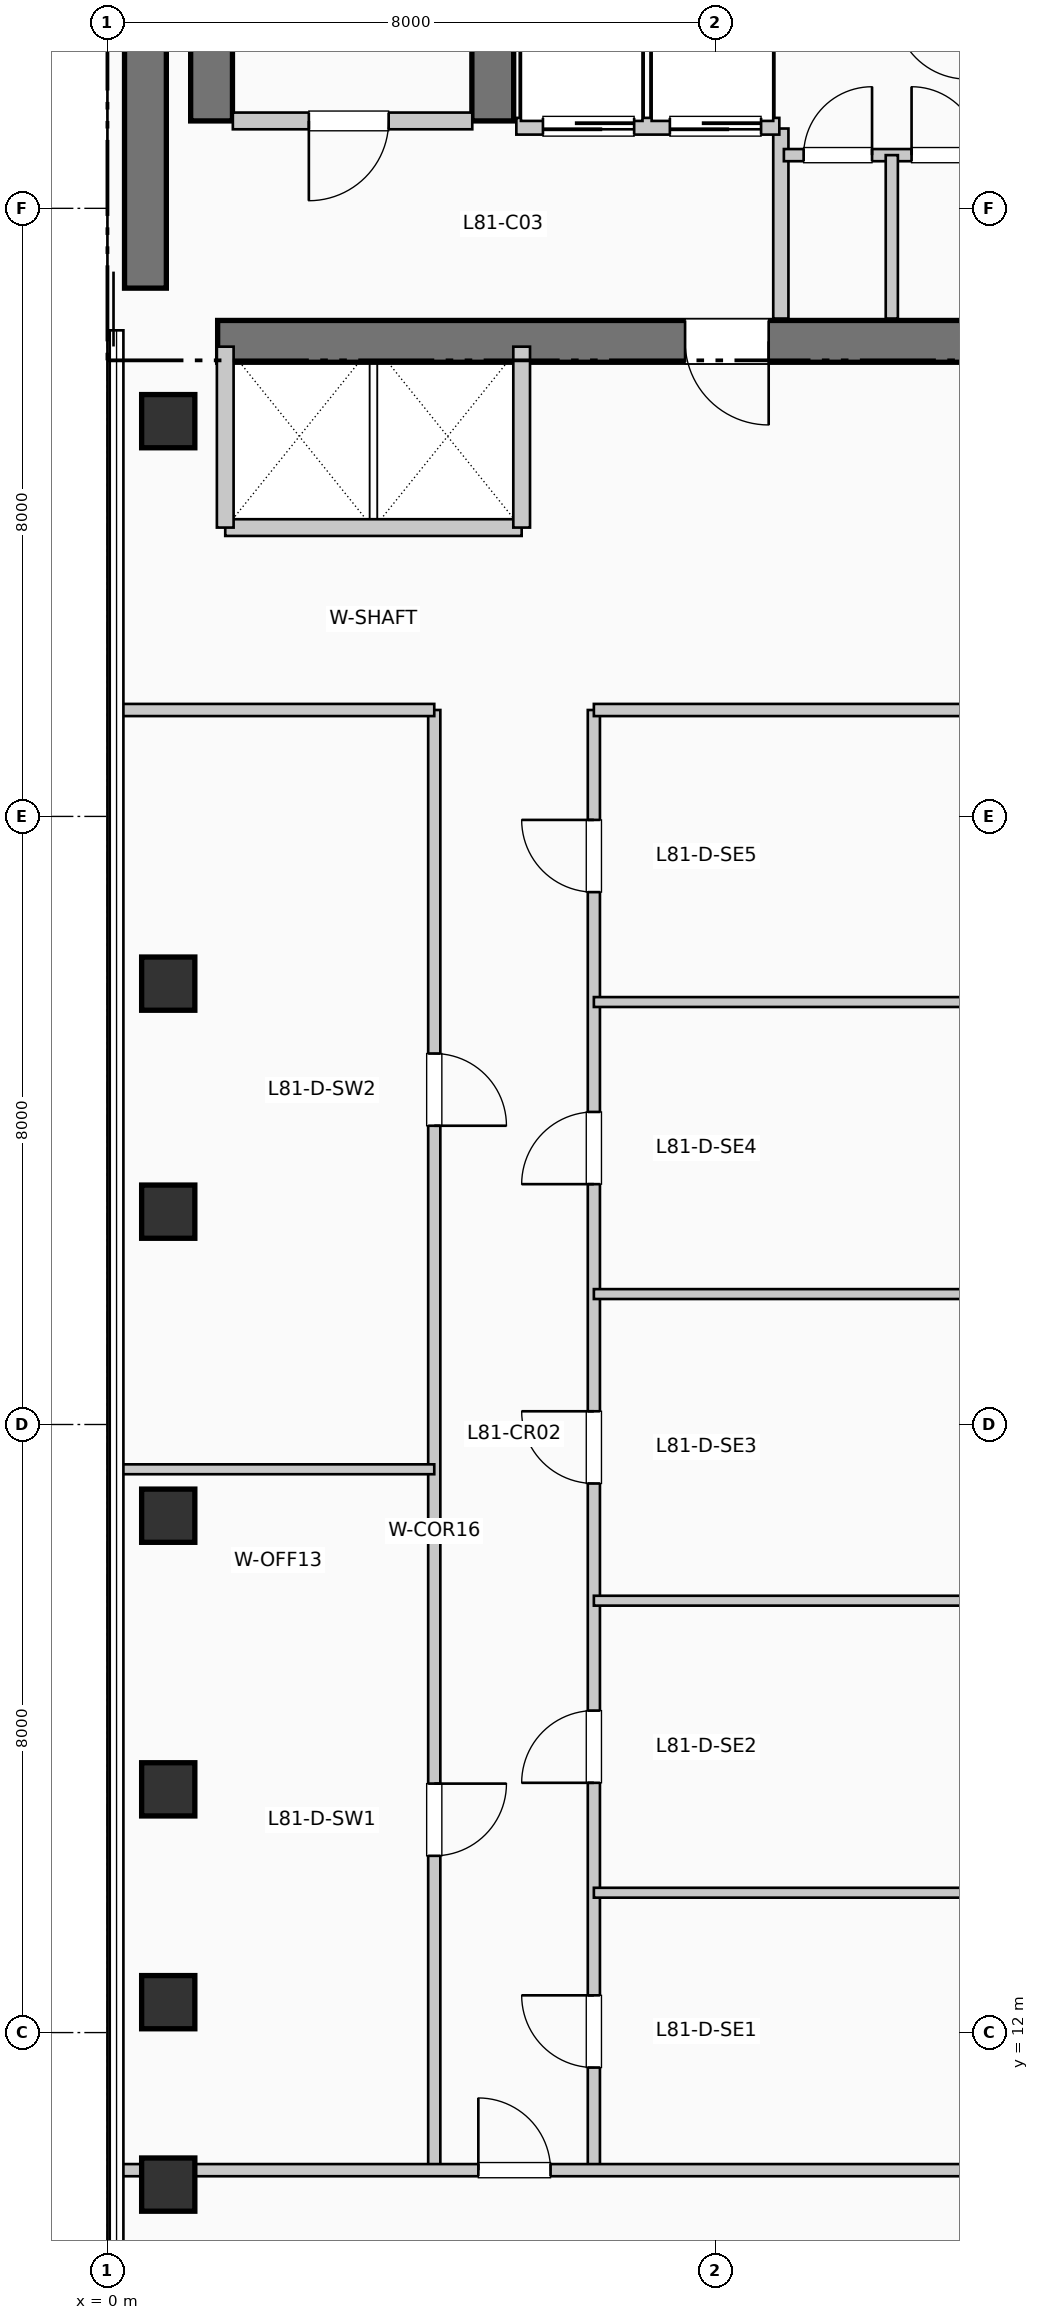
"""IFC4 building model, lengths in metres.
Left out: names, types, materials, properties, quantities, classifications, styles, units other than length and angle.
Written with IfcOpenShell. Run it as: python <this file> out.ifc"""

import sys

from ifc_helpers import new_model, si_unit, direction, frame, frame_2d, origin, origin_2d, place, context, subcontext, project, spatial, rectangle, extrude, element, fill, save


model = new_model("IFC4")
c1 = context("Model", 3, precision=1e-05, world=origin(), true_north=direction((0.0, 1.0)))
c2 = subcontext(c1, "Body", "Model", "MODEL_VIEW")
j1 = project(units=[si_unit("LENGTHUNIT", "METRE"), si_unit("PLANEANGLEUNIT", "RADIAN")], contexts=[c1])
p1 = place(None, origin())
s1 = spatial("IfcSite", under=j1, at=p1, CompositionType="ELEMENT")
p2 = place(p1, origin())
s2 = spatial("IfcBuilding", under=s1, at=p2, CompositionType="ELEMENT")
p3 = place(p2, frame((0.0, 0.0, 331.65)))
s3 = spatial("IfcBuildingStorey", under=s2, at=p3, CompositionType="ELEMENT", Elevation=331.65)
p4 = place(p3, frame((0.5, 34.95, 0.0), z_axis=(0.0, 0.0, 1.0), x_axis=(0.0, 1.0, 0.0)))
e1 = element("IfcWall", 1, at=p4, inside=s3, PredefinedType="SHEAR", context=c2, shape_type="SweptSolid", body=[
    extrude(rectangle(XDim=7.9, YDim=0.55, at=frame_2d((3.95, 0.0))), origin(), (0.0, 0.0, 1.0), 3.96),
])
p5 = place(p3, frame((1.45, 34.25, 0.0), z_axis=(0.0, 0.0, 1.0), x_axis=(1.0, 0.0, 0.0)))
e2 = element("IfcWall", 2, at=p5, inside=s3, PredefinedType="SHEAR", context=c2, shape_type="SweptSolid", body=[
    extrude(rectangle(XDim=10.71, YDim=0.55, at=frame_2d((5.355, 0.0))), origin(), (0.0, 0.0, 1.0), 3.96),
])
p6 = place(p5, frame((7.25, 0.0, 0.0), z_axis=(0.0, 0.0, 1.0), x_axis=(-1.0, 0.0, 0.0)))
e3 = element("IfcOpeningElement", 3, at=p6, cuts=e2, PredefinedType="OPENING", context=c2, shape_type="SweptSolid", body=[
    extrude(rectangle(XDim=1.1, YDim=2.15, at=frame_2d((0.55, 1.075))), frame((0.0, 0.285, 0.0), z_axis=(0.0, -1.0, 0.0), x_axis=(1.0, 0.0, 0.0)), (0.0, 0.0, 1.0), 0.57),
])
for number, where, z_axis, x_axis in (
    (4, (1.37, 37.15, 0.0), (0.0, 0.0, 1.0), (0.0, 1.0, 0.0)),
    (5, (5.07, 37.15, 0.0), (0.0, 0.0, 1.0), (0.0, 1.0, 0.0)),
):
    element("IfcWall", number, at=place(p3, frame(where, z_axis=z_axis, x_axis=x_axis)), inside=s3, PredefinedType="SHEAR", context=c2, shape_type="SweptSolid", body=[
        extrude(rectangle(XDim=7.89, YDim=0.55, at=frame_2d((3.945, 0.0))), origin(), (0.0, 0.0, 1.0), 3.96),
    ])
for number, where, z_axis, x_axis in (
    (6, (0.8, 10.0, 0.0), (0.0, 0.0, 1.0), (1.0, 0.0, 0.0)),
    (7, (0.8, 12.4, 0.0), (0.0, 0.0, 1.0), (1.0, 0.0, 0.0)),
    (8, (0.8, 15.2, 0.0), (0.0, 0.0, 1.0), (1.0, 0.0, 0.0)),
    (9, (0.8, 18.8, 0.0), (0.0, 0.0, 1.0), (1.0, 0.0, 0.0)),
    (10, (0.8, 22.8, 0.0), (0.0, 0.0, 1.0), (1.0, 0.0, 0.0)),
    (11, (0.8, 25.8, 0.0), (0.0, 0.0, 1.0), (1.0, 0.0, 0.0)),
    (12, (0.8, 33.2, 0.0), (0.0, 0.0, 1.0), (1.0, 0.0, 0.0)),
):
    element("IfcColumn", number, at=place(p3, frame(where, z_axis=z_axis, x_axis=x_axis)), inside=s3, PredefinedType="COLUMN", context=c2, shape_type="SweptSolid", body=[
        extrude(rectangle(XDim=0.7, YDim=0.7, at=origin_2d()), origin(), (0.0, 0.0, 1.0), 3.96),
    ])
p7 = place(p3, frame((1.65, 37.15, 0.0), z_axis=(0.0, 0.0, 1.0), x_axis=(1.0, 0.0, 0.0)))
e13 = element("IfcWall", 13, at=p7, inside=s3, PredefinedType="PARTITIONING", context=c2, shape_type="SweptSolid", body=[
    extrude(rectangle(XDim=3.15, YDim=0.22, at=frame_2d((1.575, 0.0))), origin(), (0.0, 0.0, 1.0), 3.74),
])
p8 = place(p7, frame((2.05, 0.0, 0.0), z_axis=(0.0, 0.0, 1.0), x_axis=(-1.0, 0.0, 0.0)))
e14 = element("IfcOpeningElement", 14, at=p8, cuts=e13, PredefinedType="OPENING", context=c2, shape_type="SweptSolid", body=[
    extrude(rectangle(XDim=1.05, YDim=2.15, at=frame_2d((0.525, 1.075))), frame((0.0, 0.12, 0.0), z_axis=(0.0, -1.0, 0.0), x_axis=(1.0, 0.0, 0.0)), (0.0, 0.0, 1.0), 0.24),
])
p9 = place(p3, frame((8.86, 34.55, 0.0), z_axis=(0.0, 0.0, 1.0), x_axis=(0.0, 1.0, 0.0)))
e15 = element("IfcWall", 15, at=p9, inside=s3, PredefinedType="PARTITIONING", context=c2, shape_type="SweptSolid", body=[
    extrude(rectangle(XDim=2.5, YDim=0.2, at=frame_2d((1.25, 0.0))), origin(), (0.0, 0.0, 1.0), 3.74),
])
p10 = place(p3, frame((5.38, 37.08, 0.0), z_axis=(0.0, 0.0, 1.0), x_axis=(1.0, 0.0, 0.0)))
e16 = element("IfcWall", 16, at=p10, inside=s3, PredefinedType="PARTITIONING", context=c2, shape_type="SweptSolid", body=[
    extrude(rectangle(XDim=3.46, YDim=0.22, at=frame_2d((1.73, 0.0))), origin(), (0.0, 0.0, 1.0), 3.74),
])
p11 = place(p10, frame((1.55, 0.0, 0.0), z_axis=(0.0, 0.0, 1.0), x_axis=(-1.0, 0.0, 0.0)))
e17 = element("IfcOpeningElement", 17, at=p11, cuts=e16, PredefinedType="OPENING", context=c2, shape_type="SweptSolid", body=[
    extrude(rectangle(XDim=1.2, YDim=2.2, at=frame_2d((0.6, 1.1))), frame((0.0, 0.12, 0.0), z_axis=(0.0, -1.0, 0.0), x_axis=(1.0, 0.0, 0.0)), (0.0, 0.0, 1.0), 0.24),
])
p12 = place(p10, frame((3.22, 0.0, 0.0), z_axis=(0.0, 0.0, 1.0), x_axis=(-1.0, 0.0, 0.0)))
e18 = element("IfcOpeningElement", 18, at=p12, cuts=e16, PredefinedType="OPENING", context=c2, shape_type="SweptSolid", body=[
    extrude(rectangle(XDim=1.2, YDim=2.2, at=frame_2d((0.6, 1.1))), frame((0.0, 0.12, 0.0), z_axis=(0.0, -1.0, 0.0), x_axis=(1.0, 0.0, 0.0)), (0.0, 0.0, 1.0), 0.24),
])
p13 = place(p3, frame((1.55, 31.8, 0.0), z_axis=(0.0, 0.0, 1.0), x_axis=(1.0, 0.0, 0.0)))
e19 = element("IfcWall", 19, at=p13, inside=s3, PredefinedType="PARTITIONING", context=c2, shape_type="SweptSolid", body=[
    extrude(rectangle(XDim=3.9, YDim=0.22, at=frame_2d((1.95, 0.0))), origin(), (0.0, 0.0, 1.0), 3.74),
])
for number, where, z_axis, x_axis in (
    (20, (1.55, 31.8, 0.0), (0.0, 0.0, 1.0), (0.0, 1.0, 0.0)),
    (21, (5.45, 31.8, 0.0), (0.0, 0.0, 1.0), (0.0, 1.0, 0.0)),
):
    element("IfcWall", number, at=place(p3, frame(where, z_axis=z_axis, x_axis=x_axis)), inside=s3, PredefinedType="PARTITIONING", context=c2, shape_type="SweptSolid", body=[
        extrude(rectangle(XDim=2.38, YDim=0.22, at=frame_2d((1.19, 0.0))), origin(), (0.0, 0.0, 1.0), 3.74),
    ])
p14 = place(p3, frame((8.9, 36.7, 0.0), z_axis=(0.0, 0.0, 1.0), x_axis=(1.0, 0.0, 0.0)))
e22 = element("IfcWall", 22, at=p14, inside=s3, PredefinedType="PARTITIONING", context=c2, shape_type="SweptSolid", body=[
    extrude(rectangle(XDim=3.25, YDim=0.16, at=frame_2d((1.625, 0.0))), origin(), (0.0, 0.0, 1.0), 3.74),
])
p15 = place(p14, frame((0.26, 0.0, 0.0)))
e23 = element("IfcOpeningElement", 23, at=p15, cuts=e22, PredefinedType="OPENING", context=c2, shape_type="SweptSolid", body=[
    extrude(rectangle(XDim=0.9, YDim=2.15, at=frame_2d((0.45, 1.075))), frame((0.0, 0.09, 0.0), z_axis=(0.0, -1.0, 0.0), x_axis=(1.0, 0.0, 0.0)), (0.0, 0.0, 1.0), 0.18),
])
p16 = place(p14, frame((1.68, 0.0, 0.0)))
e24 = element("IfcOpeningElement", 24, at=p16, cuts=e22, PredefinedType="OPENING", context=c2, shape_type="SweptSolid", body=[
    extrude(rectangle(XDim=0.9, YDim=2.15, at=frame_2d((0.45, 1.075))), frame((0.0, 0.09, 0.0), z_axis=(0.0, -1.0, 0.0), x_axis=(1.0, 0.0, 0.0)), (0.0, 0.0, 1.0), 0.18),
])
p17 = place(p3, frame((10.32, 34.55, 0.0), z_axis=(0.0, 0.0, 1.0), x_axis=(0.0, 1.0, 0.0)))
e25 = element("IfcWall", 25, at=p17, inside=s3, PredefinedType="PARTITIONING", context=c2, shape_type="SweptSolid", body=[
    extrude(rectangle(XDim=2.15, YDim=0.16, at=frame_2d((1.075, 0.0))), origin(), (0.0, 0.0, 1.0), 3.74),
])
p18 = place(p3, frame((4.3, 10.19, 0.0), z_axis=(0.0, 0.0, 1.0), x_axis=(0.0, 1.0, 0.0)))
e26 = element("IfcWall", 26, at=p18, inside=s3, PredefinedType="PARTITIONING", context=c2, shape_type="SweptSolid", body=[
    extrude(rectangle(XDim=19.21, YDim=0.16, at=frame_2d((9.605, 0.0))), origin(), (0.0, 0.0, 1.0), 3.74),
])
p19 = place(p18, frame((5.085, 0.0, 0.0), z_axis=(0.0, 0.0, 1.0), x_axis=(-1.0, 0.0, 0.0)))
e27 = element("IfcOpeningElement", 27, at=p19, cuts=e26, PredefinedType="OPENING", context=c2, shape_type="SweptSolid", body=[
    extrude(rectangle(XDim=0.95, YDim=2.15, at=frame_2d((0.475, 1.075))), frame((0.0, 0.09, 0.0), z_axis=(0.0, -1.0, 0.0), x_axis=(1.0, 0.0, 0.0)), (0.0, 0.0, 1.0), 0.18),
])
p20 = place(p18, frame((14.69, 0.0, 0.0), z_axis=(0.0, 0.0, 1.0), x_axis=(-1.0, 0.0, 0.0)))
e28 = element("IfcOpeningElement", 28, at=p20, cuts=e26, PredefinedType="OPENING", context=c2, shape_type="SweptSolid", body=[
    extrude(rectangle(XDim=0.95, YDim=2.15, at=frame_2d((0.475, 1.075))), frame((0.0, 0.09, 0.0), z_axis=(0.0, -1.0, 0.0), x_axis=(1.0, 0.0, 0.0)), (0.0, 0.0, 1.0), 0.18),
])
p21 = place(p3, frame((6.4, 10.19, 0.0), z_axis=(0.0, 0.0, 1.0), x_axis=(0.0, 1.0, 0.0)))
e29 = element("IfcWall", 29, at=p21, inside=s3, PredefinedType="PARTITIONING", context=c2, shape_type="SweptSolid", body=[
    extrude(rectangle(XDim=19.21, YDim=0.16, at=frame_2d((9.605, 0.0))), origin(), (0.0, 0.0, 1.0), 3.74),
])
p22 = place(p21, frame((1.35, 0.0, 0.0)))
e30 = element("IfcOpeningElement", 30, at=p22, cuts=e29, PredefinedType="OPENING", context=c2, shape_type="SweptSolid", body=[
    extrude(rectangle(XDim=0.95, YDim=2.15, at=frame_2d((0.475, 1.075))), frame((0.0, 0.09, 0.0), z_axis=(0.0, -1.0, 0.0), x_axis=(1.0, 0.0, 0.0)), (0.0, 0.0, 1.0), 0.18),
])
p23 = place(p21, frame((5.096, 0.0, 0.0)))
e31 = element("IfcOpeningElement", 31, at=p23, cuts=e29, PredefinedType="OPENING", context=c2, shape_type="SweptSolid", body=[
    extrude(rectangle(XDim=0.95, YDim=2.15, at=frame_2d((0.475, 1.075))), frame((0.0, 0.09, 0.0), z_axis=(0.0, -1.0, 0.0), x_axis=(1.0, 0.0, 0.0)), (0.0, 0.0, 1.0), 0.18),
])
p24 = place(p21, frame((9.034, 0.0, 0.0)))
e32 = element("IfcOpeningElement", 32, at=p24, cuts=e29, PredefinedType="OPENING", context=c2, shape_type="SweptSolid", body=[
    extrude(rectangle(XDim=0.95, YDim=2.15, at=frame_2d((0.475, 1.075))), frame((0.0, 0.09, 0.0), z_axis=(0.0, -1.0, 0.0), x_axis=(1.0, 0.0, 0.0)), (0.0, 0.0, 1.0), 0.18),
])
p25 = place(p21, frame((12.972, 0.0, 0.0)))
e33 = element("IfcOpeningElement", 33, at=p25, cuts=e29, PredefinedType="OPENING", context=c2, shape_type="SweptSolid", body=[
    extrude(rectangle(XDim=0.95, YDim=2.15, at=frame_2d((0.475, 1.075))), frame((0.0, 0.09, 0.0), z_axis=(0.0, -1.0, 0.0), x_axis=(1.0, 0.0, 0.0)), (0.0, 0.0, 1.0), 0.18),
])
p26 = place(p21, frame((16.814, 0.0, 0.0)))
e34 = element("IfcOpeningElement", 34, at=p26, cuts=e29, PredefinedType="OPENING", context=c2, shape_type="SweptSolid", body=[
    extrude(rectangle(XDim=0.95, YDim=2.15, at=frame_2d((0.475, 1.075))), frame((0.0, 0.09, 0.0), z_axis=(0.0, -1.0, 0.0), x_axis=(1.0, 0.0, 0.0)), (0.0, 0.0, 1.0), 0.18),
])
p27 = place(p3, frame((0.19, 10.19, 0.0), z_axis=(0.0, 0.0, 1.0), x_axis=(1.0, 0.0, 0.0)))
e35 = element("IfcWall", 35, at=p27, inside=s3, PredefinedType="PARTITIONING", context=c2, shape_type="SweptSolid", body=[
    extrude(rectangle(XDim=23.26, YDim=0.16, at=frame_2d((11.63, 0.0))), origin(), (0.0, 0.0, 1.0), 3.175),
])
p28 = place(p27, frame((4.69, 0.0, 0.0)))
e36 = element("IfcOpeningElement", 36, at=p28, cuts=e35, PredefinedType="OPENING", context=c2, shape_type="SweptSolid", body=[
    extrude(rectangle(XDim=0.95, YDim=2.15, at=frame_2d((0.475, 1.075))), frame((0.0, 0.09, 0.0), z_axis=(0.0, -1.0, 0.0), x_axis=(1.0, 0.0, 0.0)), (0.0, 0.0, 1.0), 0.18),
])
p29 = place(p3, frame((0.19, 29.4, 0.0), z_axis=(0.0, 0.0, 1.0), x_axis=(1.0, 0.0, 0.0)))
e37 = element("IfcWall", 37, at=p29, inside=s3, PredefinedType="PARTITIONING", context=c2, shape_type="SweptSolid", body=[
    extrude(rectangle(XDim=4.11, YDim=0.16, at=frame_2d((2.055, 0.0))), origin(), (0.0, 0.0, 1.0), 3.425),
])
p30 = place(p3, frame((6.4, 29.4, 0.0), z_axis=(0.0, 0.0, 1.0), x_axis=(1.0, 0.0, 0.0)))
e38 = element("IfcWall", 38, at=p30, inside=s3, PredefinedType="PARTITIONING", context=c2, shape_type="SweptSolid", body=[
    extrude(rectangle(XDim=17.05, YDim=0.16, at=frame_2d((8.525, 0.0))), origin(), (0.0, 0.0, 1.0), 3.425),
])
p31 = place(p3, frame((0.19, 19.411, 0.0), z_axis=(0.0, 0.0, 1.0), x_axis=(1.0, 0.0, 0.0)))
e39 = element("IfcWall", 39, at=p31, inside=s3, PredefinedType="PARTITIONING", context=c2, shape_type="SweptSolid", body=[
    extrude(rectangle(XDim=4.11, YDim=0.13, at=frame_2d((2.055, 0.0))), origin(), (0.0, 0.0, 1.0), 3.74),
])
for number, where, z_axis, x_axis in (
    (40, (6.4, 13.84, 0.0), (0.0, 0.0, 1.0), (1.0, 0.0, 0.0)),
    (41, (6.4, 17.682, 0.0), (0.0, 0.0, 1.0), (1.0, 0.0, 0.0)),
    (42, (6.4, 21.716, 0.0), (0.0, 0.0, 1.0), (1.0, 0.0, 0.0)),
):
    element("IfcWall", number, at=place(p3, frame(where, z_axis=z_axis, x_axis=x_axis)), inside=s3, PredefinedType="PARTITIONING", context=c2, shape_type="SweptSolid", body=[
        extrude(rectangle(XDim=17.05, YDim=0.13, at=frame_2d((8.525, 0.0))), origin(), (0.0, 0.0, 1.0), 3.74),
    ])
p32 = place(p3, frame((6.4, 25.558, 0.0), z_axis=(0.0, 0.0, 1.0), x_axis=(1.0, 0.0, 0.0)))
e43 = element("IfcWall", 43, at=p32, inside=s3, PredefinedType="PARTITIONING", context=c2, shape_type="SweptSolid", body=[
    extrude(rectangle(XDim=17.05, YDim=0.13, at=frame_2d((8.525, 0.0))), origin(), (0.0, 0.0, 1.0), 3.175),
])
p33 = place(p8, origin())
e44 = element("IfcDoor", 44, at=p33, inside=s3, OperationType="SINGLE_SWING_LEFT", PredefinedType="DOOR", context=c2, shape_type="SweptSolid", body=[
    extrude(rectangle(XDim=1.05, YDim=2.15, at=frame_2d((0.525, 1.075))), frame((0.0, 0.025, 0.0), z_axis=(0.0, -1.0, 0.0), x_axis=(1.0, 0.0, 0.0)), (0.0, 0.0, 1.0), 0.05),
])
fill(e14, e44)
p34 = place(p6, origin())
e45 = element("IfcDoor", 45, at=p34, inside=s3, OperationType="SINGLE_SWING_RIGHT", PredefinedType="DOOR", context=c2, shape_type="SweptSolid", body=[
    extrude(rectangle(XDim=1.1, YDim=2.15, at=frame_2d((0.55, 1.075))), frame((0.0, 0.025, 0.0), z_axis=(0.0, -1.0, 0.0), x_axis=(1.0, 0.0, 0.0)), (0.0, 0.0, 1.0), 0.05),
])
fill(e3, e45)
p35 = place(p11, origin())
e46 = element("IfcDoor", 46, at=p35, inside=s3, OperationType="SLIDING_TO_RIGHT", PredefinedType="DOOR", context=c2, shape_type="SweptSolid", body=[
    extrude(rectangle(XDim=1.2, YDim=2.2, at=frame_2d((0.6, 1.1))), frame((0.0, 0.025, 0.0), z_axis=(0.0, -1.0, 0.0), x_axis=(1.0, 0.0, 0.0)), (0.0, 0.0, 1.0), 0.05),
])
fill(e17, e46)
p36 = place(p12, origin())
e47 = element("IfcDoor", 47, at=p36, inside=s3, OperationType="SLIDING_TO_RIGHT", PredefinedType="DOOR", context=c2, shape_type="SweptSolid", body=[
    extrude(rectangle(XDim=1.2, YDim=2.2, at=frame_2d((0.6, 1.1))), frame((0.0, 0.025, 0.0), z_axis=(0.0, -1.0, 0.0), x_axis=(1.0, 0.0, 0.0)), (0.0, 0.0, 1.0), 0.05),
])
fill(e18, e47)
p37 = place(p15, origin())
e48 = element("IfcDoor", 48, at=p37, inside=s3, OperationType="SINGLE_SWING_RIGHT", PredefinedType="DOOR", context=c2, shape_type="SweptSolid", body=[
    extrude(rectangle(XDim=0.9, YDim=2.15, at=frame_2d((0.45, 1.075))), frame((0.0, 0.025, 0.0), z_axis=(0.0, -1.0, 0.0), x_axis=(1.0, 0.0, 0.0)), (0.0, 0.0, 1.0), 0.05),
])
fill(e23, e48)
p38 = place(p16, origin())
e49 = element("IfcDoor", 49, at=p38, inside=s3, OperationType="SINGLE_SWING_LEFT", PredefinedType="DOOR", context=c2, shape_type="SweptSolid", body=[
    extrude(rectangle(XDim=0.9, YDim=2.15, at=frame_2d((0.45, 1.075))), frame((0.0, 0.025, 0.0), z_axis=(0.0, -1.0, 0.0), x_axis=(1.0, 0.0, 0.0)), (0.0, 0.0, 1.0), 0.05),
])
fill(e24, e49)
p39 = place(p28, origin())
e50 = element("IfcDoor", 50, at=p39, inside=s3, OperationType="SINGLE_SWING_LEFT", PredefinedType="DOOR", context=c2, shape_type="SweptSolid", body=[
    extrude(rectangle(XDim=0.95, YDim=2.15, at=frame_2d((0.475, 1.075))), frame((0.0, 0.025, 0.0), z_axis=(0.0, -1.0, 0.0), x_axis=(1.0, 0.0, 0.0)), (0.0, 0.0, 1.0), 0.05),
])
fill(e36, e50)
p40 = place(p19, origin())
e51 = element("IfcDoor", 51, at=p40, inside=s3, OperationType="SINGLE_SWING_RIGHT", PredefinedType="DOOR", context=c2, shape_type="SweptSolid", body=[
    extrude(rectangle(XDim=0.95, YDim=2.15, at=frame_2d((0.475, 1.075))), frame((0.0, 0.025, 0.0), z_axis=(0.0, -1.0, 0.0), x_axis=(1.0, 0.0, 0.0)), (0.0, 0.0, 1.0), 0.05),
])
fill(e27, e51)
p41 = place(p20, origin())
e52 = element("IfcDoor", 52, at=p41, inside=s3, OperationType="SINGLE_SWING_LEFT", PredefinedType="DOOR", context=c2, shape_type="SweptSolid", body=[
    extrude(rectangle(XDim=0.95, YDim=2.15, at=frame_2d((0.475, 1.075))), frame((0.0, 0.025, 0.0), z_axis=(0.0, -1.0, 0.0), x_axis=(1.0, 0.0, 0.0)), (0.0, 0.0, 1.0), 0.05),
])
fill(e28, e52)
p42 = place(p22, origin())
e53 = element("IfcDoor", 53, at=p42, inside=s3, OperationType="SINGLE_SWING_RIGHT", PredefinedType="DOOR", context=c2, shape_type="SweptSolid", body=[
    extrude(rectangle(XDim=0.95, YDim=2.15, at=frame_2d((0.475, 1.075))), frame((0.0, 0.025, 0.0), z_axis=(0.0, -1.0, 0.0), x_axis=(1.0, 0.0, 0.0)), (0.0, 0.0, 1.0), 0.05),
])
fill(e30, e53)
p43 = place(p23, origin())
e54 = element("IfcDoor", 54, at=p43, inside=s3, OperationType="SINGLE_SWING_LEFT", PredefinedType="DOOR", context=c2, shape_type="SweptSolid", body=[
    extrude(rectangle(XDim=0.95, YDim=2.15, at=frame_2d((0.475, 1.075))), frame((0.0, 0.025, 0.0), z_axis=(0.0, -1.0, 0.0), x_axis=(1.0, 0.0, 0.0)), (0.0, 0.0, 1.0), 0.05),
])
fill(e31, e54)
p44 = place(p24, origin())
e55 = element("IfcDoor", 55, at=p44, inside=s3, OperationType="SINGLE_SWING_RIGHT", PredefinedType="DOOR", context=c2, shape_type="SweptSolid", body=[
    extrude(rectangle(XDim=0.95, YDim=2.15, at=frame_2d((0.475, 1.075))), frame((0.0, 0.025, 0.0), z_axis=(0.0, -1.0, 0.0), x_axis=(1.0, 0.0, 0.0)), (0.0, 0.0, 1.0), 0.05),
])
fill(e32, e55)
p45 = place(p25, origin())
e56 = element("IfcDoor", 56, at=p45, inside=s3, OperationType="SINGLE_SWING_LEFT", PredefinedType="DOOR", context=c2, shape_type="SweptSolid", body=[
    extrude(rectangle(XDim=0.95, YDim=2.15, at=frame_2d((0.475, 1.075))), frame((0.0, 0.025, 0.0), z_axis=(0.0, -1.0, 0.0), x_axis=(1.0, 0.0, 0.0)), (0.0, 0.0, 1.0), 0.05),
])
fill(e33, e56)
p46 = place(p26, origin())
e57 = element("IfcDoor", 57, at=p46, inside=s3, OperationType="SINGLE_SWING_RIGHT", PredefinedType="DOOR", context=c2, shape_type="SweptSolid", body=[
    extrude(rectangle(XDim=0.95, YDim=2.15, at=frame_2d((0.475, 1.075))), frame((0.0, 0.025, 0.0), z_axis=(0.0, -1.0, 0.0), x_axis=(1.0, 0.0, 0.0)), (0.0, 0.0, 1.0), 0.05),
])
fill(e34, e57)
save(model, sys.argv[1])
